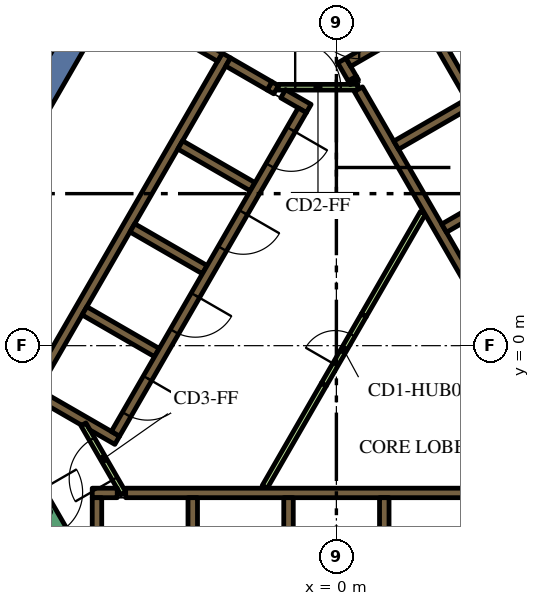
"""IFC4 building model, lengths in metres.
Left out: names, types, materials, properties, quantities, classifications, styles, units other than length and angle.
Written with IfcOpenShell. Run it as: python <this file> out.ifc"""

import sys

from ifc_helpers import new_model, si_unit, direction, frame, frame_2d, origin, place, context, subcontext, project, spatial, polyline, rectangle, outline, extrude, element, fill, save


model = new_model("IFC4")
c1 = context("Model", 3, precision=1e-05, world=origin(), true_north=direction((0.0, 1.0)))
c2 = subcontext(c1, "Body", "Model", "MODEL_VIEW")
j1 = project(units=[si_unit("LENGTHUNIT", "METRE"), si_unit("PLANEANGLEUNIT", "RADIAN")], contexts=[c1])
p1 = place(None, origin())
s1 = spatial("IfcSite", under=j1, at=p1, CompositionType="ELEMENT")
p2 = place(p1, origin())
s2 = spatial("IfcBuilding", under=s1, at=p2, CompositionType="ELEMENT")
p3 = place(p2, frame((0.0, 0.0, 235.2)))
s3 = spatial("IfcBuildingStorey", under=s2, at=p3, CompositionType="ELEMENT", Elevation=235.2)
p4 = place(p3, frame((8.235, 5.736, 0.0), z_axis=(0.0, 0.0, 1.0), x_axis=(-0.499983401189, 0.8660349869, 0.0)))
e1 = element("IfcWall", 1, at=p4, inside=s3, PredefinedType="SOLIDWALL", context=c2, shape_type="SweptSolid", body=[
    extrude(rectangle(XDim=12.472, YDim=0.7, at=frame_2d((6.236, 0.0))), origin(), (0.0, 0.0, 1.0), 4.2),
])
p5 = place(p3, frame((-12.625, -1.867, 0.0), z_axis=(0.0, 0.0, 1.0), x_axis=(0.500008520515, 0.866020484407, 0.0)))
e2 = element("IfcWall", 2, at=p5, inside=s3, PredefinedType="SOLIDWALL", context=c2, shape_type="SweptSolid", body=[
    extrude(rectangle(XDim=15.859, YDim=0.7, at=frame_2d((7.929, 0.0))), origin(), (0.0, 0.0, 1.0), 4.2),
])
p6 = place(p3, frame((-5.545, -3.875, 0.0), z_axis=(0.0, 0.0, 1.0), x_axis=(1.0, 0.0, 0.0)))
e3 = element("IfcWall", 3, at=p6, inside=s3, PredefinedType="SOLIDWALL", context=c2, shape_type="SweptSolid", body=[
    extrude(rectangle(XDim=11.97, YDim=0.25, at=frame_2d((5.985, 0.0))), origin(), (0.0, 0.0, 1.0), 4.2),
])
p7 = place(p3, frame((-6.425, -3.875, 0.0), z_axis=(0.0, 0.0, 1.0), x_axis=(1.0, 0.0, 0.0)))
e4 = element("IfcWall", 4, at=p7, inside=s3, PredefinedType="SOLIDWALL", context=c2, shape_type="SweptSolid", body=[
    extrude(rectangle(XDim=0.658, YDim=0.25, at=frame_2d((0.329, 0.0))), origin(), (0.0, 0.0, 1.0), 4.2),
])
for number, where, z_axis, x_axis in (
    (5, (1.26, -4.0, 0.0), (0.0, 0.0, 1.0), (0.0, -1.0, 0.0)),
    (6, (-1.26, -4.0, 0.0), (0.0, 0.0, 1.0), (0.0, -1.0, 0.0)),
    (7, (-3.78, -4.0, 0.0), (0.0, 0.0, 1.0), (0.0, -1.0, 0.0)),
):
    element("IfcWall", number, at=place(p3, frame(where, z_axis=z_axis, x_axis=x_axis)), inside=s3, PredefinedType="SOLIDWALL", context=c2, shape_type="SweptSolid", body=[
        extrude(rectangle(XDim=2.2, YDim=0.25, at=frame_2d((1.1, 0.0))), origin(), (0.0, 0.0, 1.0), 4.2),
    ])
p8 = place(p3, frame((-6.3, -7.125, 0.0), z_axis=(0.0, 0.0, 1.0), x_axis=(0.0, 1.0, 0.0)))
e8 = element("IfcWall", 8, at=p8, inside=s3, PredefinedType="SOLIDWALL", context=c2, shape_type="SweptSolid", body=[
    extrude(rectangle(XDim=3.125, YDim=0.25, at=frame_2d((1.562, 0.0))), origin(), (0.0, 0.0, 1.0), 4.2),
])
p9 = place(p3, frame((0.473, 6.93, 0.0), z_axis=(0.0, 0.0, 1.0), x_axis=(-0.49972245349, 0.866185586049, 0.0)))
e9 = element("IfcWall", 9, at=p9, inside=s3, PredefinedType="SOLIDWALL", context=c2, shape_type="SweptSolid", body=[
    extrude(rectangle(XDim=0.11, YDim=0.25, at=frame_2d((0.055, 0.0))), origin(), (0.0, 0.0, 1.0), 4.2),
])
p10 = place(p3, frame((6.568, -3.627, 0.0), z_axis=(0.0, 0.0, 1.0), x_axis=(-0.499999455981, 0.866025717874, 0.0)))
e10 = element("IfcWall", 10, at=p10, inside=s3, PredefinedType="SOLIDWALL", context=c2, shape_type="SweptSolid", body=[
    extrude(rectangle(XDim=11.978, YDim=0.25, at=frame_2d((5.989, 0.0))), origin(), (0.0, 0.0, 1.0), 4.2),
])
p11 = place(p3, frame((0.417, 7.027, 0.0), z_axis=(0.0, 0.0, 1.0), x_axis=(-0.500210807569, 0.865903659763, 0.0)))
e11 = element("IfcWall", 11, at=p11, inside=s3, PredefinedType="SOLIDWALL", context=c2, shape_type="SweptSolid", body=[
    extrude(rectangle(XDim=0.548, YDim=0.25, at=frame_2d((0.274, 0.0))), origin(), (0.0, 0.0, 1.0), 4.2),
])
p12 = place(p3, frame((3.1, 9.064, 0.0), z_axis=(0.0, 0.0, 1.0), x_axis=(-0.866030133475, -0.499991807846, 0.0)))
e12 = element("IfcWall", 12, at=p12, inside=s3, PredefinedType="SOLIDWALL", context=c2, shape_type="SweptSolid", body=[
    extrude(rectangle(XDim=3.217, YDim=0.25, at=frame_2d((1.608, 0.0))), origin(), (0.0, 0.0, 1.0), 4.2),
])
p13 = place(p3, frame((1.574, 5.274, 0.0), z_axis=(0.0, 0.0, 1.0), x_axis=(0.866028486751, 0.499994660107, 0.0)))
e13 = element("IfcWall", 13, at=p13, inside=s3, PredefinedType="SOLIDWALL", context=c2, shape_type="SweptSolid", body=[
    extrude(rectangle(XDim=2.2, YDim=0.25, at=frame_2d((1.1, 0.0))), origin(), (0.0, 0.0, 1.0), 4.2),
])
p14 = place(p3, frame((2.834, 3.091, 0.0), z_axis=(0.0, 0.0, 1.0), x_axis=(0.866008176907, 0.50002983664, 0.0)))
e14 = element("IfcWall", 14, at=p14, inside=s3, PredefinedType="SOLIDWALL", context=c2, shape_type="SweptSolid", body=[
    extrude(rectangle(XDim=2.2, YDim=0.25, at=frame_2d((1.1, 0.0))), origin(), (0.0, 0.0, 1.0), 4.2),
])
p15 = place(p3, frame((-8.06, -1.311, 0.0), z_axis=(0.0, 0.0, 1.0), x_axis=(0.50000273126, 0.866023826885, 0.0)))
e15 = element("IfcWall", 15, at=p15, inside=s3, PredefinedType="SOLIDWALL", context=c2, shape_type="SweptSolid", body=[
    extrude(rectangle(XDim=10.33, YDim=0.25, at=frame_2d((5.165, 0.0))), origin(), (0.0, 0.0, 1.0), 4.2),
])
p16 = place(p3, frame((-1.758, 6.835, 0.0), z_axis=(0.0, 0.0, 1.0), x_axis=(0.865982457891, -0.500074377092, 0.0)))
e16 = element("IfcWall", 16, at=p16, inside=s3, PredefinedType="SOLIDWALL", context=c2, shape_type="SweptSolid", body=[
    extrude(rectangle(XDim=0.2, YDim=0.25, at=frame_2d((0.1, 0.0))), origin(), (0.0, 0.0, 1.0), 4.2),
])
p17 = place(p3, frame((-1.76, 6.836, 0.0), z_axis=(0.0, 0.0, 1.0), x_axis=(-0.865952863304, 0.500125622755, 0.0)))
e17 = element("IfcWall", 17, at=p17, inside=s3, PredefinedType="SOLIDWALL", context=c2, shape_type="SweptSolid", body=[
    extrude(rectangle(XDim=1.258, YDim=0.25, at=frame_2d((0.629, 0.0))), origin(), (0.0, 0.0, 1.0), 4.2),
])
p18 = place(p3, frame((-0.728, 6.24, 0.0), z_axis=(0.0, 0.0, 1.0), x_axis=(-0.865955664968, 0.500120771724, 0.0)))
e18 = element("IfcWall", 18, at=p18, inside=s3, PredefinedType="SOLIDWALL", context=c2, shape_type="SweptSolid", body=[
    extrude(rectangle(XDim=0.778, YDim=0.25, at=frame_2d((0.389, 0.0))), origin(), (0.0, 0.0, 1.0), 4.2),
])
for number, where, z_axis, x_axis in (
    (19, (-2.204, 4.182, 0.0), (0.0, 0.0, 1.0), (-0.866, 0.5, 0.0)),
    (20, (-5.369, 3.1, 0.0), (0.0, 0.0, 1.0), (0.866, -0.5, 0.0)),
    (21, (-4.724, -0.182, 0.0), (0.0, 0.0, 1.0), (-0.866, 0.5, 0.0)),
):
    element("IfcWall", number, at=place(p3, frame(where, z_axis=z_axis, x_axis=x_axis)), inside=s3, PredefinedType="SOLIDWALL", context=c2, shape_type="SweptSolid", body=[
        extrude(rectangle(XDim=2.2, YDim=0.25, at=frame_2d((1.1, 0.0))), origin(), (0.0, 0.0, 1.0), 4.2),
    ])
p19 = place(p3, origin())
e22 = element("IfcWall", 22, at=p19, inside=s3, PredefinedType="SOLIDWALL", context=c2, shape_type="SweptSolid", body=[
    extrude(outline(polyline([(-5.922, -2.257), (-5.922, -2.257), (-5.705, -2.382), (-5.83, -2.598), (-6.483, -2.221), (-6.591, -2.033), (-6.591, -2.033), (-6.7, -2.096), (-7.952, -1.373), (-7.827, -1.156), (-5.922, -2.257)])), origin(), (0.0, 0.0, 1.0), 4.2),
])
p20 = place(p3, frame((-3.066, 7.59, 0.0), z_axis=(0.0, 0.0, 1.0), x_axis=(-0.866081358704, 0.49990307071, 0.0)))
e23 = element("IfcWall", 23, at=p20, inside=s3, PredefinedType="SOLIDWALL", context=c2, shape_type="SweptSolid", body=[
    extrude(rectangle(XDim=0.858, YDim=0.25, at=frame_2d((0.429, 0.0))), origin(), (0.0, 0.0, 1.0), 4.2),
])
p21 = place(p3, frame((-1.887, -3.718, 0.0), z_axis=(0.0, 0.0, 1.0), x_axis=(0.500043732237, 0.866000153493, 0.0)))
e24 = element("IfcWall", 24, at=p21, inside=s3, PredefinedType="PARTITIONING", context=c2, shape_type="SweptSolid", body=[
    extrude(rectangle(XDim=3.114, YDim=0.15, at=frame_2d((1.557, 0.0))), origin(), (0.0, 0.0, 1.0), 3.45),
])
p22 = place(p3, frame((0.72, 0.797, 0.0), z_axis=(0.0, 0.0, 1.0), x_axis=(0.499984921984, 0.866034108906, 0.0)))
e25 = element("IfcWall", 25, at=p22, inside=s3, PredefinedType="PARTITIONING", context=c2, shape_type="SweptSolid", body=[
    extrude(rectangle(XDim=3.113, YDim=0.15, at=frame_2d((1.557, 0.0))), origin(), (0.0, 0.0, 1.0), 3.45),
])
p23 = place(p3, frame((8.565, -2.185, 0.0), z_axis=(0.0, 0.0, 1.0), x_axis=(-0.499997954832, 0.866026584559, 0.0)))
e26 = element("IfcWall", 26, at=p23, inside=s3, PredefinedType="SOLIDWALL", context=c2, shape_type="SweptSolid", body=[
    extrude(rectangle(XDim=12.35, YDim=0.25, at=frame_2d((6.175, 0.0))), origin(), (0.0, 0.0, 1.0), 4.2),
])
p24 = place(p23, frame((0.585, 0.0, 0.0)))
e27 = element("IfcOpeningElement", 27, at=p24, cuts=e26, PredefinedType="OPENING", context=c2, shape_type="SweptSolid", body=[
    extrude(rectangle(XDim=1.1, YDim=2.1, at=frame_2d((0.55, 1.05))), frame((0.0, 0.135, 0.0), z_axis=(0.0, -1.0, 0.0), x_axis=(1.0, 0.0, 0.0)), (0.0, 0.0, 1.0), 0.27),
])
p25 = place(p3, frame((-0.898, 6.194, 0.0), z_axis=(0.0, 0.0, 1.0), x_axis=(-0.499996202215, -0.866027596426, 0.0)))
e28 = element("IfcWall", 28, at=p25, inside=s3, PredefinedType="SOLIDWALL", context=c2, shape_type="SweptSolid", body=[
    extrude(rectangle(XDim=9.83, YDim=0.25, at=frame_2d((4.915, 0.0))), origin(), (0.0, 0.0, 1.0), 4.2),
])
p26 = place(p25, frame((0.585, 0.0, 0.0)))
e29 = element("IfcOpeningElement", 29, at=p26, cuts=e28, PredefinedType="OPENING", context=c2, shape_type="SweptSolid", body=[
    extrude(rectangle(XDim=1.1, YDim=2.1, at=frame_2d((0.55, 1.05))), frame((0.0, 0.135, 0.0), z_axis=(0.0, -1.0, 0.0), x_axis=(1.0, 0.0, 0.0)), (0.0, 0.0, 1.0), 0.27),
])
p27 = place(p25, frame((3.105, 0.0, 0.0)))
e30 = element("IfcOpeningElement", 30, at=p27, cuts=e28, PredefinedType="OPENING", context=c2, shape_type="SweptSolid", body=[
    extrude(rectangle(XDim=1.1, YDim=2.1, at=frame_2d((0.55, 1.05))), frame((0.0, 0.135, 0.0), z_axis=(0.0, -1.0, 0.0), x_axis=(1.0, 0.0, 0.0)), (0.0, 0.0, 1.0), 0.27),
])
p28 = place(p25, frame((5.625, 0.0, 0.0)))
e31 = element("IfcOpeningElement", 31, at=p28, cuts=e28, PredefinedType="OPENING", context=c2, shape_type="SweptSolid", body=[
    extrude(rectangle(XDim=1.1, YDim=2.1, at=frame_2d((0.55, 1.05))), frame((0.0, 0.135, 0.0), z_axis=(0.0, -1.0, 0.0), x_axis=(1.0, 0.0, 0.0)), (0.0, 0.0, 1.0), 0.27),
])
p29 = place(p25, frame((8.145, 0.0, 0.0)))
e32 = element("IfcOpeningElement", 32, at=p29, cuts=e28, PredefinedType="OPENING", context=c2, shape_type="SweptSolid", body=[
    extrude(rectangle(XDim=1.1, YDim=2.1, at=frame_2d((0.55, 1.05))), frame((0.0, 0.135, 0.0), z_axis=(0.0, -1.0, 0.0), x_axis=(1.0, 0.0, 0.0)), (0.0, 0.0, 1.0), 0.27),
])
p30 = place(p3, frame((-8.103, -3.466, 0.0), z_axis=(0.0, 0.0, 1.0), x_axis=(0.500078061341, -0.865980330357, 0.0)))
e33 = element("IfcWall", 33, at=p30, inside=s3, PredefinedType="SOLIDWALL", context=c2, shape_type="SweptSolid", body=[
    extrude(rectangle(XDim=2.1, YDim=0.4, at=frame_2d((1.05, 0.0))), origin(), (0.0, 0.0, 1.0), 4.2),
])
p31 = place(p30, frame((0.45, 0.0, 0.0)))
e34 = element("IfcOpeningElement", 34, at=p31, cuts=e33, PredefinedType="OPENING", context=c2, shape_type="SweptSolid", body=[
    extrude(rectangle(XDim=1.2, YDim=2.1, at=frame_2d((0.6, 1.05))), frame((0.0, 0.21, 0.0), z_axis=(0.0, -1.0, 0.0), x_axis=(1.0, 0.0, 0.0)), (0.0, 0.0, 1.0), 0.42),
])
p32 = place(p3, frame((-0.33, -1.022, 0.0), z_axis=(0.0, 0.0, 1.0), x_axis=(0.500027713859, 0.866009402589, 0.0)))
e35 = element("IfcWall", 35, at=p32, inside=s3, PredefinedType="PARTITIONING", context=c2, shape_type="SweptSolid", body=[
    extrude(rectangle(XDim=2.1, YDim=0.15, at=frame_2d((1.05, 0.0))), origin(), (0.0, 0.0, 1.0), 3.45),
])
p33 = place(p32, frame((0.6, 0.0, 0.0)))
e36 = element("IfcOpeningElement", 36, at=p33, cuts=e35, PredefinedType="OPENING", context=c2, shape_type="SweptSolid", body=[
    extrude(rectangle(XDim=0.9, YDim=2.1, at=frame_2d((0.45, 1.05))), frame((0.0, 0.085, 0.0), z_axis=(0.0, -1.0, 0.0), x_axis=(1.0, 0.0, 0.0)), (0.0, 0.0, 1.0), 0.17),
])
p34 = place(p3, frame((-1.534, 6.8, 0.0), z_axis=(0.0, 0.0, 1.0), x_axis=(1.0, 0.0, 0.0)))
e37 = element("IfcWall", 37, at=p34, inside=s3, PredefinedType="PARTITIONING", context=c2, shape_type="SweptSolid", body=[
    extrude(rectangle(XDim=2.1, YDim=0.15, at=frame_2d((1.05, 0.0))), origin(), (0.0, 0.0, 1.0), 3.45),
])
p35 = place(p34, frame((0.45, 0.0, 0.0)))
e38 = element("IfcOpeningElement", 38, at=p35, cuts=e37, PredefinedType="OPENING", context=c2, shape_type="SweptSolid", body=[
    extrude(rectangle(XDim=1.2, YDim=2.1, at=frame_2d((0.6, 1.05))), frame((0.0, 0.085, 0.0), z_axis=(0.0, -1.0, 0.0), x_axis=(1.0, 0.0, 0.0)), (0.0, 0.0, 1.0), 0.17),
])
p36 = place(p3, frame((-5.606, -3.89, 0.0), z_axis=(0.0, 0.0, 1.0), x_axis=(-0.500027713859, 0.866009402589, 0.0)))
e39 = element("IfcWall", 39, at=p36, inside=s3, PredefinedType="PARTITIONING", context=c2, shape_type="SweptSolid", body=[
    extrude(rectangle(XDim=2.1, YDim=0.15, at=frame_2d((1.05, 0.0))), origin(), (0.0, 0.0, 1.0), 3.45),
])
p37 = place(p36, frame((0.45, 0.0, 0.0)))
e40 = element("IfcOpeningElement", 40, at=p37, cuts=e39, PredefinedType="OPENING", context=c2, shape_type="SweptSolid", body=[
    extrude(rectangle(XDim=1.2, YDim=2.1, at=frame_2d((0.6, 1.05))), frame((0.0, 0.085, 0.0), z_axis=(0.0, -1.0, 0.0), x_axis=(1.0, 0.0, 0.0)), (0.0, 0.0, 1.0), 0.17),
])
p38 = place(p3, frame((-7.061, 15.069, 0.0), z_axis=(0.0, 0.0, 1.0), x_axis=(-0.500008127286, -0.866020711443, 0.0)))
e41 = element("IfcWall", 41, at=p38, inside=s3, PredefinedType="PARTITIONING", context=c2, shape_type="SweptSolid", body=[
    extrude(rectangle(XDim=9.42, YDim=0.2, at=frame_2d((4.71, 0.0))), origin(), (0.0, 0.0, 1.0), 3.45),
])
p39 = place(p38, frame((4.2, 0.0, 0.0)))
e42 = element("IfcOpeningElement", 42, at=p39, cuts=e41, PredefinedType="OPENING", context=c2, shape_type="SweptSolid", body=[
    extrude(rectangle(XDim=1.0, YDim=2.1, at=frame_2d((0.5, 1.05))), frame((0.0, 0.11, 0.0), z_axis=(0.0, -1.0, 0.0), x_axis=(1.0, 0.0, 0.0)), (0.0, 0.0, 1.0), 0.22),
])
p40 = place(p26, origin())
e43 = element("IfcDoor", 43, at=p40, inside=s3, OperationType="DOUBLE_DOOR_SLIDING", PredefinedType="DOOR", context=c2, shape_type="SweptSolid", body=[
    extrude(rectangle(XDim=1.1, YDim=2.1, at=frame_2d((0.55, 1.05))), frame((0.0, 0.025, 0.0), z_axis=(0.0, -1.0, 0.0), x_axis=(1.0, 0.0, 0.0)), (0.0, 0.0, 1.0), 0.05),
])
fill(e29, e43)
p41 = place(p27, origin())
e44 = element("IfcDoor", 44, at=p41, inside=s3, OperationType="DOUBLE_DOOR_SLIDING", PredefinedType="DOOR", context=c2, shape_type="SweptSolid", body=[
    extrude(rectangle(XDim=1.1, YDim=2.1, at=frame_2d((0.55, 1.05))), frame((0.0, 0.025, 0.0), z_axis=(0.0, -1.0, 0.0), x_axis=(1.0, 0.0, 0.0)), (0.0, 0.0, 1.0), 0.05),
])
fill(e30, e44)
p42 = place(p28, origin())
e45 = element("IfcDoor", 45, at=p42, inside=s3, OperationType="DOUBLE_DOOR_SLIDING", PredefinedType="DOOR", context=c2, shape_type="SweptSolid", body=[
    extrude(rectangle(XDim=1.1, YDim=2.1, at=frame_2d((0.55, 1.05))), frame((0.0, 0.025, 0.0), z_axis=(0.0, -1.0, 0.0), x_axis=(1.0, 0.0, 0.0)), (0.0, 0.0, 1.0), 0.05),
])
fill(e31, e45)
p43 = place(p29, origin())
e46 = element("IfcDoor", 46, at=p43, inside=s3, OperationType="DOUBLE_DOOR_SLIDING", PredefinedType="DOOR", context=c2, shape_type="SweptSolid", body=[
    extrude(rectangle(XDim=1.1, YDim=2.1, at=frame_2d((0.55, 1.05))), frame((0.0, 0.025, 0.0), z_axis=(0.0, -1.0, 0.0), x_axis=(1.0, 0.0, 0.0)), (0.0, 0.0, 1.0), 0.05),
])
fill(e32, e46)
p44 = place(p31, origin())
e47 = element("IfcDoor", 47, at=p44, inside=s3, OperationType="SINGLE_SWING_LEFT", PredefinedType="DOOR", context=c2, shape_type="SweptSolid", body=[
    extrude(rectangle(XDim=1.2, YDim=2.1, at=frame_2d((0.6, 1.05))), frame((0.0, 0.025, 0.0), z_axis=(0.0, -1.0, 0.0), x_axis=(1.0, 0.0, 0.0)), (0.0, 0.0, 1.0), 0.05),
])
fill(e34, e47)
p45 = place(p33, origin())
e48 = element("IfcDoor", 48, at=p45, inside=s3, OperationType="SINGLE_SWING_LEFT", PredefinedType="DOOR", context=c2, shape_type="SweptSolid", body=[
    extrude(rectangle(XDim=0.9, YDim=2.1, at=frame_2d((0.45, 1.05))), frame((0.0, 0.025, 0.0), z_axis=(0.0, -1.0, 0.0), x_axis=(1.0, 0.0, 0.0)), (0.0, 0.0, 1.0), 0.05),
])
fill(e36, e48)
p46 = place(p35, origin())
e49 = element("IfcDoor", 49, at=p46, inside=s3, OperationType="SINGLE_SWING_LEFT", PredefinedType="DOOR", context=c2, shape_type="SweptSolid", body=[
    extrude(rectangle(XDim=1.2, YDim=2.1, at=frame_2d((0.6, 1.05))), frame((0.0, 0.025, 0.0), z_axis=(0.0, -1.0, 0.0), x_axis=(1.0, 0.0, 0.0)), (0.0, 0.0, 1.0), 0.05),
])
fill(e38, e49)
p47 = place(p37, origin())
e50 = element("IfcDoor", 50, at=p47, inside=s3, OperationType="SINGLE_SWING_LEFT", PredefinedType="DOOR", context=c2, shape_type="SweptSolid", body=[
    extrude(rectangle(XDim=1.2, YDim=2.1, at=frame_2d((0.6, 1.05))), frame((0.0, 0.025, 0.0), z_axis=(0.0, -1.0, 0.0), x_axis=(1.0, 0.0, 0.0)), (0.0, 0.0, 1.0), 0.05),
])
fill(e40, e50)
save(model, sys.argv[1])
